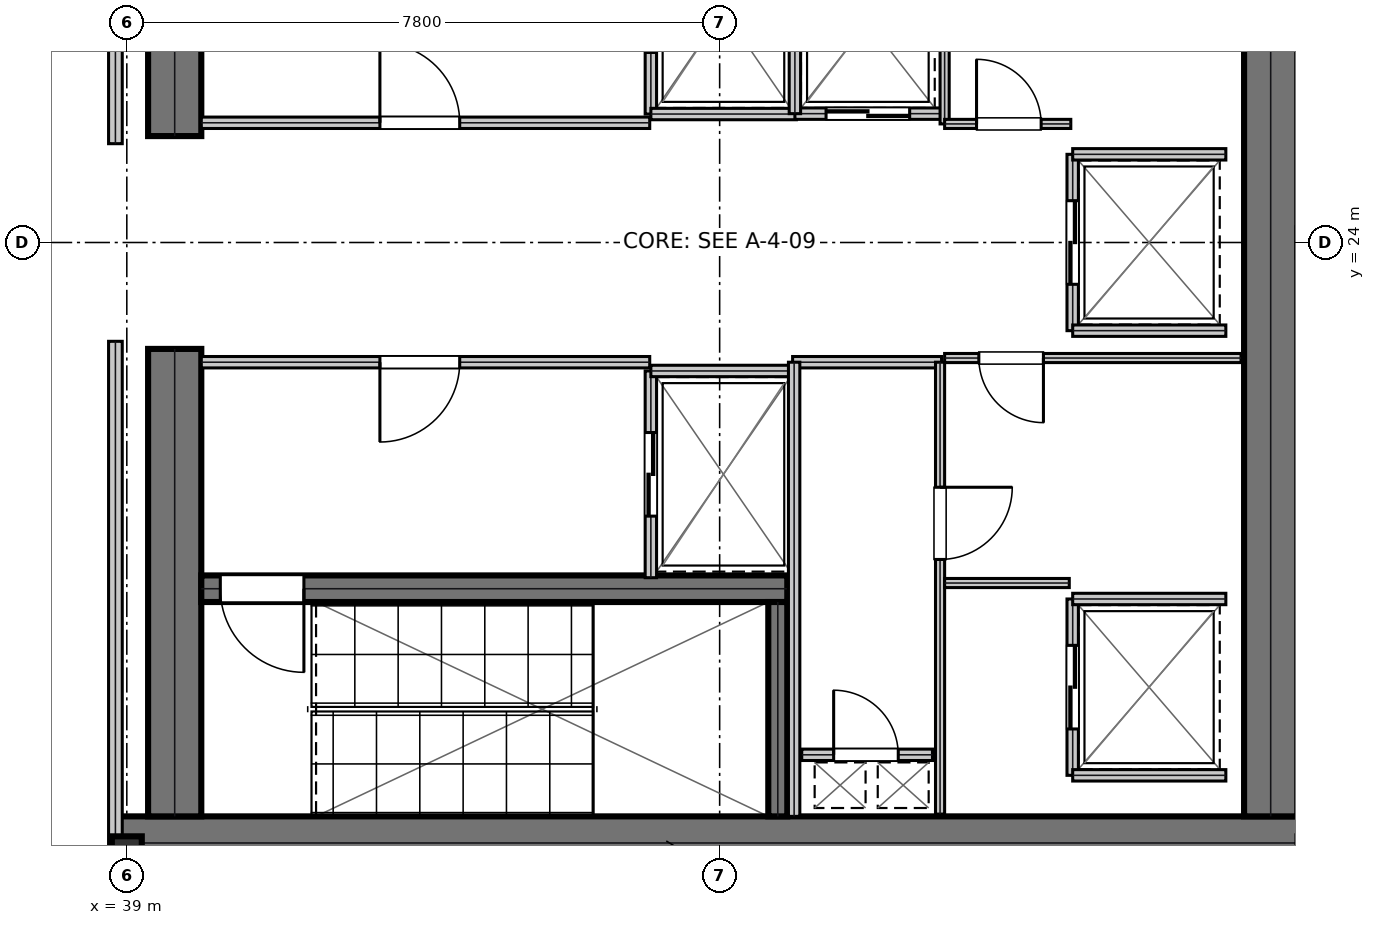
"""IFC4 building model, lengths in metres.
Left out: names, types, materials, properties, quantities, classifications, styles, units other than length and angle.
Written with IfcOpenShell. Run it as: python <this file> out.ifc"""

import sys

from ifc_helpers import new_model, si_unit, direction, frame, frame_2d, origin, origin_2d, place, context, subcontext, project, spatial, rectangle, i_section, extrude, element, fill, save


model = new_model("IFC4")
c1 = context("Model", 3, precision=1e-05, world=origin(), true_north=direction((0.0, 1.0)))
c2 = subcontext(c1, "Body", "Model", "MODEL_VIEW")
j1 = project(units=[si_unit("LENGTHUNIT", "METRE"), si_unit("PLANEANGLEUNIT", "RADIAN")], contexts=[c1])
p1 = place(None, origin())
s1 = spatial("IfcSite", under=j1, at=p1, CompositionType="ELEMENT")
p2 = place(p1, origin())
s2 = spatial("IfcBuilding", under=s1, at=p2, CompositionType="ELEMENT")
p3 = place(p2, frame((0.0, 0.0, 187.05)))
s3 = spatial("IfcBuildingStorey", under=s2, at=p3, CompositionType="ELEMENT", Elevation=187.05)
p4 = place(p3, frame((38.8, 16.1, 0.0), z_axis=(0.0, 0.0, 1.0), x_axis=(1.0, 0.0, 0.0)))
e1 = element("IfcWall", 1, at=p4, inside=s3, PredefinedType="SHEAR", context=c2, shape_type="SweptSolid", body=[
    extrude(rectangle(XDim=16.0, YDim=0.7, at=frame_2d((8.0, 0.0))), origin(), (0.0, 0.0, 1.0), 4.54),
])
for number, where, z_axis, x_axis in (
    (2, (39.63, 16.45, 0.0), (0.0, 0.0, 1.0), (0.0, 1.0, 0.0)),
    (3, (39.63, 25.4, 0.0), (0.0, 0.0, 1.0), (0.0, 1.0, 0.0)),
):
    element("IfcWall", number, at=place(p3, frame(where, z_axis=z_axis, x_axis=x_axis)), inside=s3, PredefinedType="SHEAR", context=c2, shape_type="SweptSolid", body=[
        extrude(rectangle(XDim=6.15, YDim=0.7, at=frame_2d((3.075, 0.0))), origin(), (0.0, 0.0, 1.0), 4.54),
    ])
p5 = place(p3, frame((54.05, 16.45, 0.0), z_axis=(0.0, 0.0, 1.0), x_axis=(0.0, 1.0, 0.0)))
e4 = element("IfcWall", 4, at=p5, inside=s3, PredefinedType="SHEAR", context=c2, shape_type="SweptSolid", body=[
    extrude(rectangle(XDim=15.1, YDim=0.7, at=frame_2d((7.55, 0.0))), origin(), (0.0, 0.0, 1.0), 4.54),
])
p6 = place(p3, frame((39.98, 19.445, 0.0), z_axis=(0.0, 0.0, 1.0), x_axis=(1.0, 0.0, 0.0)))
e5 = element("IfcWall", 5, at=p6, inside=s3, PredefinedType="SHEAR", context=c2, shape_type="SweptSolid", body=[
    extrude(rectangle(XDim=7.71, YDim=0.35, at=frame_2d((3.855, 0.0))), origin(), (0.0, 0.0, 1.0), 4.54),
])
p7 = place(p6, frame((0.25, 0.0, 0.0)))
e6 = element("IfcOpeningElement", 6, at=p7, cuts=e5, PredefinedType="OPENING", context=c2, shape_type="SweptSolid", body=[
    extrude(rectangle(XDim=1.1, YDim=2.15, at=frame_2d((0.55, 1.075))), frame((0.0, 0.185, 0.0), z_axis=(0.0, -1.0, 0.0), x_axis=(1.0, 0.0, 0.0)), (0.0, 0.0, 1.0), 0.37),
])
p8 = place(p3, frame((47.565, 16.45, 0.0), z_axis=(0.0, 0.0, 1.0), x_axis=(0.0, 1.0, 0.0)))
e7 = element("IfcWall", 7, at=p8, inside=s3, PredefinedType="SHEAR", context=c2, shape_type="SweptSolid", body=[
    extrude(rectangle(XDim=2.82, YDim=0.25, at=frame_2d((1.41, 0.0))), origin(), (0.0, 0.0, 1.0), 4.54),
])
p9 = place(p3, frame((39.0, 16.0, 0.0), z_axis=(0.0, 0.0, 1.0), x_axis=(1.0, 0.0, 0.0)))
e8 = element("IfcColumn", 8, at=p9, inside=s3, PredefinedType="COLUMN", context=c2, shape_type="SweptSolid", body=[
    extrude(i_section(OverallWidth=0.394, OverallDepth=0.375, WebThickness=0.017, FlangeThickness=0.028, at=origin_2d()), origin(), (0.0, 0.0, 1.0), 4.794),
])
p10 = place(p3, frame((39.98, 25.575, 0.0), z_axis=(0.0, 0.0, 1.0), x_axis=(1.0, 0.0, 0.0)))
e9 = element("IfcWall", 9, at=p10, inside=s3, PredefinedType="PARTITIONING", context=c2, shape_type="SweptSolid", body=[
    extrude(rectangle(XDim=5.9, YDim=0.15, at=frame_2d((2.95, 0.0))), origin(), (0.0, 0.0, 1.0), 4.54),
])
p11 = place(p10, frame((2.35, 0.0, 0.0)))
e10 = element("IfcOpeningElement", 10, at=p11, cuts=e9, PredefinedType="OPENING", context=c2, shape_type="SweptSolid", body=[
    extrude(rectangle(XDim=1.05, YDim=2.15, at=frame_2d((0.525, 1.075))), frame((0.0, 0.085, 0.0), z_axis=(0.0, -1.0, 0.0), x_axis=(1.0, 0.0, 0.0)), (0.0, 0.0, 1.0), 0.17),
])
p12 = place(p3, frame((39.98, 22.425, 0.0), z_axis=(0.0, 0.0, 1.0), x_axis=(1.0, 0.0, 0.0)))
e11 = element("IfcWall", 11, at=p12, inside=s3, PredefinedType="PARTITIONING", context=c2, shape_type="SweptSolid", body=[
    extrude(rectangle(XDim=5.9, YDim=0.15, at=frame_2d((2.95, 0.0))), origin(), (0.0, 0.0, 1.0), 4.54),
])
p13 = place(p12, frame((2.35, 0.0, 0.0)))
e12 = element("IfcOpeningElement", 12, at=p13, cuts=e11, PredefinedType="OPENING", context=c2, shape_type="SweptSolid", body=[
    extrude(rectangle(XDim=1.05, YDim=2.15, at=frame_2d((0.525, 1.075))), frame((0.0, 0.085, 0.0), z_axis=(0.0, -1.0, 0.0), x_axis=(1.0, 0.0, 0.0)), (0.0, 0.0, 1.0), 0.17),
])
p14 = place(p3, frame((45.895, 25.69, 0.0), z_axis=(0.0, 0.0, 1.0), x_axis=(0.0, 1.0, 0.0)))
e13 = element("IfcWall", 13, at=p14, inside=s3, PredefinedType="PARTITIONING", context=c2, shape_type="SweptSolid", body=[
    extrude(rectangle(XDim=2.72, YDim=0.15, at=frame_2d((1.36, 0.0))), origin(), (0.0, 0.0, 1.0), 4.54),
])
p15 = place(p14, frame((0.81, 0.0, 0.0)))
e14 = element("IfcOpeningElement", 14, at=p15, cuts=e13, PredefinedType="OPENING", context=c2, shape_type="SweptSolid", body=[
    extrude(rectangle(XDim=1.1, YDim=2.15, at=frame_2d((0.55, 1.075))), frame((0.0, 0.085, 0.0), z_axis=(0.0, -1.0, 0.0), x_axis=(1.0, 0.0, 0.0)), (0.0, 0.0, 1.0), 0.17),
])
p16 = place(p3, frame((45.895, 25.69, 0.0), z_axis=(0.0, 0.0, 1.0), x_axis=(1.0, 0.0, 0.0)))
e15 = element("IfcWall", 15, at=p16, inside=s3, PredefinedType="PARTITIONING", context=c2, shape_type="SweptSolid", body=[
    extrude(rectangle(XDim=1.915, YDim=0.15, at=frame_2d((0.958, 0.0))), origin(), (0.0, 0.0, 1.0), 4.54),
])
p17 = place(p3, frame((45.895, 19.59, 0.0), z_axis=(0.0, 0.0, 1.0), x_axis=(0.0, 1.0, 0.0)))
e16 = element("IfcWall", 16, at=p17, inside=s3, PredefinedType="PARTITIONING", context=c2, shape_type="SweptSolid", body=[
    extrude(rectangle(XDim=2.72, YDim=0.15, at=frame_2d((1.36, 0.0))), origin(), (0.0, 0.0, 1.0), 4.54),
])
p18 = place(p17, frame((0.81, 0.0, 0.0)))
e17 = element("IfcOpeningElement", 17, at=p18, cuts=e16, PredefinedType="OPENING", context=c2, shape_type="SweptSolid", body=[
    extrude(rectangle(XDim=1.1, YDim=2.15, at=frame_2d((0.55, 1.075))), frame((0.0, 0.085, 0.0), z_axis=(0.0, -1.0, 0.0), x_axis=(1.0, 0.0, 0.0)), (0.0, 0.0, 1.0), 0.17),
])
p19 = place(p3, frame((45.895, 22.31, 0.0), z_axis=(0.0, 0.0, 1.0), x_axis=(1.0, 0.0, 0.0)))
e18 = element("IfcWall", 18, at=p19, inside=s3, PredefinedType="PARTITIONING", context=c2, shape_type="SweptSolid", body=[
    extrude(rectangle(XDim=1.915, YDim=0.15, at=frame_2d((0.958, 0.0))), origin(), (0.0, 0.0, 1.0), 4.54),
])
p20 = place(p3, frame((47.79, 25.695, 0.0), z_axis=(0.0, 0.0, 1.0), x_axis=(1.0, 0.0, 0.0)))
e19 = element("IfcWall", 19, at=p20, inside=s3, PredefinedType="PARTITIONING", context=c2, shape_type="SweptSolid", body=[
    extrude(rectangle(XDim=1.92, YDim=0.15, at=frame_2d((0.96, 0.0))), origin(), (0.0, 0.0, 1.0), 4.54),
])
p21 = place(p20, frame((0.41, 0.0, 0.0)))
e20 = element("IfcOpeningElement", 20, at=p21, cuts=e19, PredefinedType="OPENING", context=c2, shape_type="SweptSolid", body=[
    extrude(rectangle(XDim=1.1, YDim=2.15, at=frame_2d((0.55, 1.075))), frame((0.0, 0.085, 0.0), z_axis=(0.0, -1.0, 0.0), x_axis=(1.0, 0.0, 0.0)), (0.0, 0.0, 1.0), 0.17),
])
p22 = place(p3, frame((47.79, 25.695, 0.0), z_axis=(0.0, 0.0, 1.0), x_axis=(0.0, 1.0, 0.0)))
e21 = element("IfcWall", 21, at=p22, inside=s3, PredefinedType="PARTITIONING", context=c2, shape_type="SweptSolid", body=[
    extrude(rectangle(XDim=2.415, YDim=0.15, at=frame_2d((1.208, 0.0))), origin(), (0.0, 0.0, 1.0), 4.54),
])
p23 = place(p3, frame((51.445, 22.84, 0.0), z_axis=(0.0, 0.0, 1.0), x_axis=(0.0, 1.0, 0.0)))
e22 = element("IfcWall", 22, at=p23, inside=s3, PredefinedType="PARTITIONING", context=c2, shape_type="SweptSolid", body=[
    extrude(rectangle(XDim=2.32, YDim=0.15, at=frame_2d((1.16, 0.0))), origin(), (0.0, 0.0, 1.0), 4.54),
])
p24 = place(p23, frame((0.61, 0.0, 0.0)))
e23 = element("IfcOpeningElement", 23, at=p24, cuts=e22, PredefinedType="OPENING", context=c2, shape_type="SweptSolid", body=[
    extrude(rectangle(XDim=1.1, YDim=2.15, at=frame_2d((0.55, 1.075))), frame((0.0, 0.085, 0.0), z_axis=(0.0, -1.0, 0.0), x_axis=(1.0, 0.0, 0.0)), (0.0, 0.0, 1.0), 0.17),
])
for number, where, z_axis, x_axis in (
    (24, (51.445, 22.84, 0.0), (0.0, 0.0, 1.0), (1.0, 0.0, 0.0)),
    (25, (51.445, 25.16, 0.0), (0.0, 0.0, 1.0), (1.0, 0.0, 0.0)),
):
    element("IfcWall", number, at=place(p3, frame(where, z_axis=z_axis, x_axis=x_axis)), inside=s3, PredefinedType="PARTITIONING", context=c2, shape_type="SweptSolid", body=[
        extrude(rectangle(XDim=2.015, YDim=0.15, at=frame_2d((1.007, 0.0))), origin(), (0.0, 0.0, 1.0), 4.54),
    ])
p25 = place(p3, frame((51.445, 16.99, 0.0), z_axis=(0.0, 0.0, 1.0), x_axis=(0.0, 1.0, 0.0)))
e26 = element("IfcWall", 26, at=p25, inside=s3, PredefinedType="PARTITIONING", context=c2, shape_type="SweptSolid", body=[
    extrude(rectangle(XDim=2.32, YDim=0.15, at=frame_2d((1.16, 0.0))), origin(), (0.0, 0.0, 1.0), 4.54),
])
p26 = place(p25, frame((0.61, 0.0, 0.0)))
e27 = element("IfcOpeningElement", 27, at=p26, cuts=e26, PredefinedType="OPENING", context=c2, shape_type="SweptSolid", body=[
    extrude(rectangle(XDim=1.1, YDim=2.15, at=frame_2d((0.55, 1.075))), frame((0.0, 0.085, 0.0), z_axis=(0.0, -1.0, 0.0), x_axis=(1.0, 0.0, 0.0)), (0.0, 0.0, 1.0), 0.17),
])
for number, where, z_axis, x_axis in (
    (28, (51.445, 16.99, 0.0), (0.0, 0.0, 1.0), (1.0, 0.0, 0.0)),
    (29, (51.445, 19.31, 0.0), (0.0, 0.0, 1.0), (1.0, 0.0, 0.0)),
):
    element("IfcWall", number, at=place(p3, frame(where, z_axis=z_axis, x_axis=x_axis)), inside=s3, PredefinedType="PARTITIONING", context=c2, shape_type="SweptSolid", body=[
        extrude(rectangle(XDim=2.015, YDim=0.15, at=frame_2d((1.007, 0.0))), origin(), (0.0, 0.0, 1.0), 4.54),
    ])
p27 = place(p3, frame((47.88, 17.26, 0.0), z_axis=(0.0, 0.0, 1.0), x_axis=(1.0, 0.0, 0.0)))
e30 = element("IfcWall", 30, at=p27, inside=s3, PredefinedType="PARTITIONING", context=c2, shape_type="SweptSolid", body=[
    extrude(rectangle(XDim=1.72, YDim=0.15, at=frame_2d((0.86, 0.0))), origin(), (0.0, 0.0, 1.0), 4.54),
])
p28 = place(p27, frame((0.42, 0.0, 0.0)))
e31 = element("IfcOpeningElement", 31, at=p28, cuts=e30, PredefinedType="OPENING", context=c2, shape_type="SweptSolid", body=[
    extrude(rectangle(XDim=0.85, YDim=2.15, at=frame_2d((0.425, 1.075))), frame((0.0, 0.085, 0.0), z_axis=(0.0, -1.0, 0.0), x_axis=(1.0, 0.0, 0.0)), (0.0, 0.0, 1.0), 0.17),
])
p29 = place(p3, frame((47.76, 22.425, 0.0), z_axis=(0.0, 0.0, 1.0), x_axis=(1.0, 0.0, 0.0)))
e32 = element("IfcWall", 32, at=p29, inside=s3, PredefinedType="PARTITIONING", context=c2, shape_type="SweptSolid", body=[
    extrude(rectangle(XDim=1.96, YDim=0.15, at=frame_2d((0.98, 0.0))), origin(), (0.0, 0.0, 1.0), 4.54),
])
p30 = place(p3, frame((47.78, 16.45, 0.0), z_axis=(0.0, 0.0, 1.0), x_axis=(0.0, 1.0, 0.0)))
e33 = element("IfcWall", 33, at=p30, inside=s3, PredefinedType="PARTITIONING", context=c2, shape_type="SweptSolid", body=[
    extrude(rectangle(XDim=5.975, YDim=0.15, at=frame_2d((2.988, 0.0))), origin(), (0.0, 0.0, 1.0), 4.54),
])
p31 = place(p3, frame((49.7, 16.48, 0.0), z_axis=(0.0, 0.0, 1.0), x_axis=(0.0, 1.0, 0.0)))
e34 = element("IfcWall", 34, at=p31, inside=s3, PredefinedType="PARTITIONING", context=c2, shape_type="SweptSolid", body=[
    extrude(rectangle(XDim=5.945, YDim=0.12, at=frame_2d((2.973, 0.0))), origin(), (0.0, 0.0, 1.0), 4.54),
])
p32 = place(p31, frame((3.35, 0.0, 0.0)))
e35 = element("IfcOpeningElement", 35, at=p32, cuts=e34, PredefinedType="OPENING", context=c2, shape_type="SweptSolid", body=[
    extrude(rectangle(XDim=0.95, YDim=2.15, at=frame_2d((0.475, 1.075))), frame((0.0, 0.07, 0.0), z_axis=(0.0, -1.0, 0.0), x_axis=(1.0, 0.0, 0.0)), (0.0, 0.0, 1.0), 0.14),
])
p33 = place(p3, frame((49.76, 22.48, 0.0), z_axis=(0.0, 0.0, 1.0), x_axis=(1.0, 0.0, 0.0)))
e36 = element("IfcWall", 36, at=p33, inside=s3, PredefinedType="PARTITIONING", context=c2, shape_type="SweptSolid", body=[
    extrude(rectangle(XDim=3.9, YDim=0.12, at=frame_2d((1.95, 0.0))), origin(), (0.0, 0.0, 1.0), 4.54),
])
p34 = place(p33, frame((0.45, 0.0, 0.0)))
e37 = element("IfcOpeningElement", 37, at=p34, cuts=e36, PredefinedType="OPENING", context=c2, shape_type="SweptSolid", body=[
    extrude(rectangle(XDim=0.85, YDim=2.15, at=frame_2d((0.425, 1.075))), frame((0.0, 0.07, 0.0), z_axis=(0.0, -1.0, 0.0), x_axis=(1.0, 0.0, 0.0)), (0.0, 0.0, 1.0), 0.14),
])
p35 = place(p3, frame((49.76, 19.52, 0.0), z_axis=(0.0, 0.0, 1.0), x_axis=(1.0, 0.0, 0.0)))
e38 = element("IfcWall", 38, at=p35, inside=s3, PredefinedType="PARTITIONING", context=c2, shape_type="SweptSolid", body=[
    extrude(rectangle(XDim=1.64, YDim=0.12, at=frame_2d((0.82, 0.0))), origin(), (0.0, 0.0, 1.0), 4.54),
])
p36 = place(p3, frame((49.76, 25.56, 0.0), z_axis=(0.0, 0.0, 1.0), x_axis=(0.0, 1.0, 0.0)))
e39 = element("IfcWall", 39, at=p36, inside=s3, PredefinedType="PARTITIONING", context=c2, shape_type="SweptSolid", body=[
    extrude(rectangle(XDim=2.66, YDim=0.12, at=frame_2d((1.33, 0.0))), origin(), (0.0, 0.0, 1.0), 4.54),
])
p37 = place(p3, frame((49.76, 25.56, 0.0), z_axis=(0.0, 0.0, 1.0), x_axis=(1.0, 0.0, 0.0)))
e40 = element("IfcWall", 40, at=p37, inside=s3, PredefinedType="PARTITIONING", context=c2, shape_type="SweptSolid", body=[
    extrude(rectangle(XDim=1.66, YDim=0.12, at=frame_2d((0.83, 0.0))), origin(), (0.0, 0.0, 1.0), 4.54),
])
p38 = place(p37, frame((0.42, 0.0, 0.0)))
e41 = element("IfcOpeningElement", 41, at=p38, cuts=e40, PredefinedType="OPENING", context=c2, shape_type="SweptSolid", body=[
    extrude(rectangle(XDim=0.85, YDim=2.15, at=frame_2d((0.425, 1.075))), frame((0.0, 0.07, 0.0), z_axis=(0.0, -1.0, 0.0), x_axis=(1.0, 0.0, 0.0)), (0.0, 0.0, 1.0), 0.14),
])
for number, where, z_axis, x_axis in (
    (42, (38.85, 14.5, 0.0), (0.0, 0.0, 1.0), (0.0, 1.0, 0.0)),
    (43, (38.85, 25.3, 0.0), (0.0, 0.0, 1.0), (0.0, 1.0, 0.0)),
):
    element("IfcWall", number, at=place(p3, frame(where, z_axis=z_axis, x_axis=x_axis)), inside=s3, PredefinedType="SOLIDWALL", context=c2, shape_type="SweptSolid", body=[
        extrude(rectangle(XDim=8.2, YDim=0.18, at=frame_2d((4.1, 0.0))), origin(), (0.0, 0.0, 1.0), 3.991),
    ])
p39 = place(p11, origin())
e44 = element("IfcDoor", 44, at=p39, inside=s3, OperationType="SINGLE_SWING_LEFT", PredefinedType="DOOR", context=c2, shape_type="SweptSolid", body=[
    extrude(rectangle(XDim=1.05, YDim=2.15, at=frame_2d((0.525, 1.075))), frame((0.0, 0.025, 0.0), z_axis=(0.0, -1.0, 0.0), x_axis=(1.0, 0.0, 0.0)), (0.0, 0.0, 1.0), 0.05),
])
fill(e10, e44)
p40 = place(p13, frame((1.05, 0.0, 0.0), z_axis=(0.0, 0.0, 1.0), x_axis=(-1.0, 0.0, 0.0)))
e45 = element("IfcDoor", 45, at=p40, inside=s3, OperationType="SINGLE_SWING_RIGHT", PredefinedType="DOOR", context=c2, shape_type="SweptSolid", body=[
    extrude(rectangle(XDim=1.05, YDim=2.15, at=frame_2d((0.525, 1.075))), frame((0.0, 0.025, 0.0), z_axis=(0.0, -1.0, 0.0), x_axis=(1.0, 0.0, 0.0)), (0.0, 0.0, 1.0), 0.05),
])
fill(e12, e45)
p41 = place(p18, frame((1.1, 0.0, 0.0), z_axis=(0.0, 0.0, 1.0), x_axis=(-1.0, 0.0, 0.0)))
e46 = element("IfcDoor", 46, at=p41, inside=s3, OperationType="DOUBLE_DOOR_SLIDING", PredefinedType="DOOR", context=c2, shape_type="SweptSolid", body=[
    extrude(rectangle(XDim=1.1, YDim=2.15, at=frame_2d((0.55, 1.075))), frame((0.0, 0.025, 0.0), z_axis=(0.0, -1.0, 0.0), x_axis=(1.0, 0.0, 0.0)), (0.0, 0.0, 1.0), 0.05),
])
fill(e17, e46)
p42 = place(p21, frame((1.1, 0.0, 0.0), z_axis=(0.0, 0.0, 1.0), x_axis=(-1.0, 0.0, 0.0)))
e47 = element("IfcDoor", 47, at=p42, inside=s3, OperationType="DOUBLE_DOOR_SLIDING", PredefinedType="DOOR", context=c2, shape_type="SweptSolid", body=[
    extrude(rectangle(XDim=1.1, YDim=2.15, at=frame_2d((0.55, 1.075))), frame((0.0, 0.025, 0.0), z_axis=(0.0, -1.0, 0.0), x_axis=(1.0, 0.0, 0.0)), (0.0, 0.0, 1.0), 0.05),
])
fill(e20, e47)
p43 = place(p24, frame((1.1, 0.0, 0.0), z_axis=(0.0, 0.0, 1.0), x_axis=(-1.0, 0.0, 0.0)))
e48 = element("IfcDoor", 48, at=p43, inside=s3, OperationType="DOUBLE_DOOR_SLIDING", PredefinedType="DOOR", context=c2, shape_type="SweptSolid", body=[
    extrude(rectangle(XDim=1.1, YDim=2.15, at=frame_2d((0.55, 1.075))), frame((0.0, 0.025, 0.0), z_axis=(0.0, -1.0, 0.0), x_axis=(1.0, 0.0, 0.0)), (0.0, 0.0, 1.0), 0.05),
])
fill(e23, e48)
p44 = place(p26, frame((1.1, 0.0, 0.0), z_axis=(0.0, 0.0, 1.0), x_axis=(-1.0, 0.0, 0.0)))
e49 = element("IfcDoor", 49, at=p44, inside=s3, OperationType="DOUBLE_DOOR_SLIDING", PredefinedType="DOOR", context=c2, shape_type="SweptSolid", body=[
    extrude(rectangle(XDim=1.1, YDim=2.15, at=frame_2d((0.55, 1.075))), frame((0.0, 0.025, 0.0), z_axis=(0.0, -1.0, 0.0), x_axis=(1.0, 0.0, 0.0)), (0.0, 0.0, 1.0), 0.05),
])
fill(e27, e49)
p45 = place(p28, origin())
e50 = element("IfcDoor", 50, at=p45, inside=s3, OperationType="SINGLE_SWING_LEFT", PredefinedType="TRAPDOOR", context=c2, shape_type="SweptSolid", body=[
    extrude(rectangle(XDim=0.85, YDim=2.15, at=frame_2d((0.425, 1.075))), frame((0.0, 0.025, 0.0), z_axis=(0.0, -1.0, 0.0), x_axis=(1.0, 0.0, 0.0)), (0.0, 0.0, 1.0), 0.05),
])
fill(e31, e50)
p46 = place(p32, frame((0.95, 0.0, 0.0), z_axis=(0.0, 0.0, 1.0), x_axis=(-1.0, 0.0, 0.0)))
e51 = element("IfcDoor", 51, at=p46, inside=s3, OperationType="SINGLE_SWING_LEFT", PredefinedType="DOOR", context=c2, shape_type="SweptSolid", body=[
    extrude(rectangle(XDim=0.95, YDim=2.15, at=frame_2d((0.475, 1.075))), frame((0.0, 0.025, 0.0), z_axis=(0.0, -1.0, 0.0), x_axis=(1.0, 0.0, 0.0)), (0.0, 0.0, 1.0), 0.05),
])
fill(e35, e51)
p47 = place(p34, frame((0.85, 0.0, 0.0), z_axis=(0.0, 0.0, 1.0), x_axis=(-1.0, 0.0, 0.0)))
e52 = element("IfcDoor", 52, at=p47, inside=s3, OperationType="SINGLE_SWING_LEFT", PredefinedType="DOOR", context=c2, shape_type="SweptSolid", body=[
    extrude(rectangle(XDim=0.85, YDim=2.15, at=frame_2d((0.425, 1.075))), frame((0.0, 0.025, 0.0), z_axis=(0.0, -1.0, 0.0), x_axis=(1.0, 0.0, 0.0)), (0.0, 0.0, 1.0), 0.05),
])
fill(e37, e52)
p48 = place(p38, origin())
e53 = element("IfcDoor", 53, at=p48, inside=s3, OperationType="SINGLE_SWING_LEFT", PredefinedType="DOOR", context=c2, shape_type="SweptSolid", body=[
    extrude(rectangle(XDim=0.85, YDim=2.15, at=frame_2d((0.425, 1.075))), frame((0.0, 0.025, 0.0), z_axis=(0.0, -1.0, 0.0), x_axis=(1.0, 0.0, 0.0)), (0.0, 0.0, 1.0), 0.05),
])
fill(e41, e53)
p49 = place(p7, frame((1.1, 0.0, 0.0), z_axis=(0.0, 0.0, 1.0), x_axis=(-1.0, 0.0, 0.0)))
e54 = element("IfcDoor", 54, at=p49, inside=s3, OperationType="SINGLE_SWING_LEFT", PredefinedType="DOOR", context=c2, shape_type="SweptSolid", body=[
    extrude(rectangle(XDim=1.1, YDim=2.15, at=frame_2d((0.55, 1.075))), frame((0.0, 0.025, 0.0), z_axis=(0.0, -1.0, 0.0), x_axis=(1.0, 0.0, 0.0)), (0.0, 0.0, 1.0), 0.05),
])
fill(e6, e54)
save(model, sys.argv[1])
